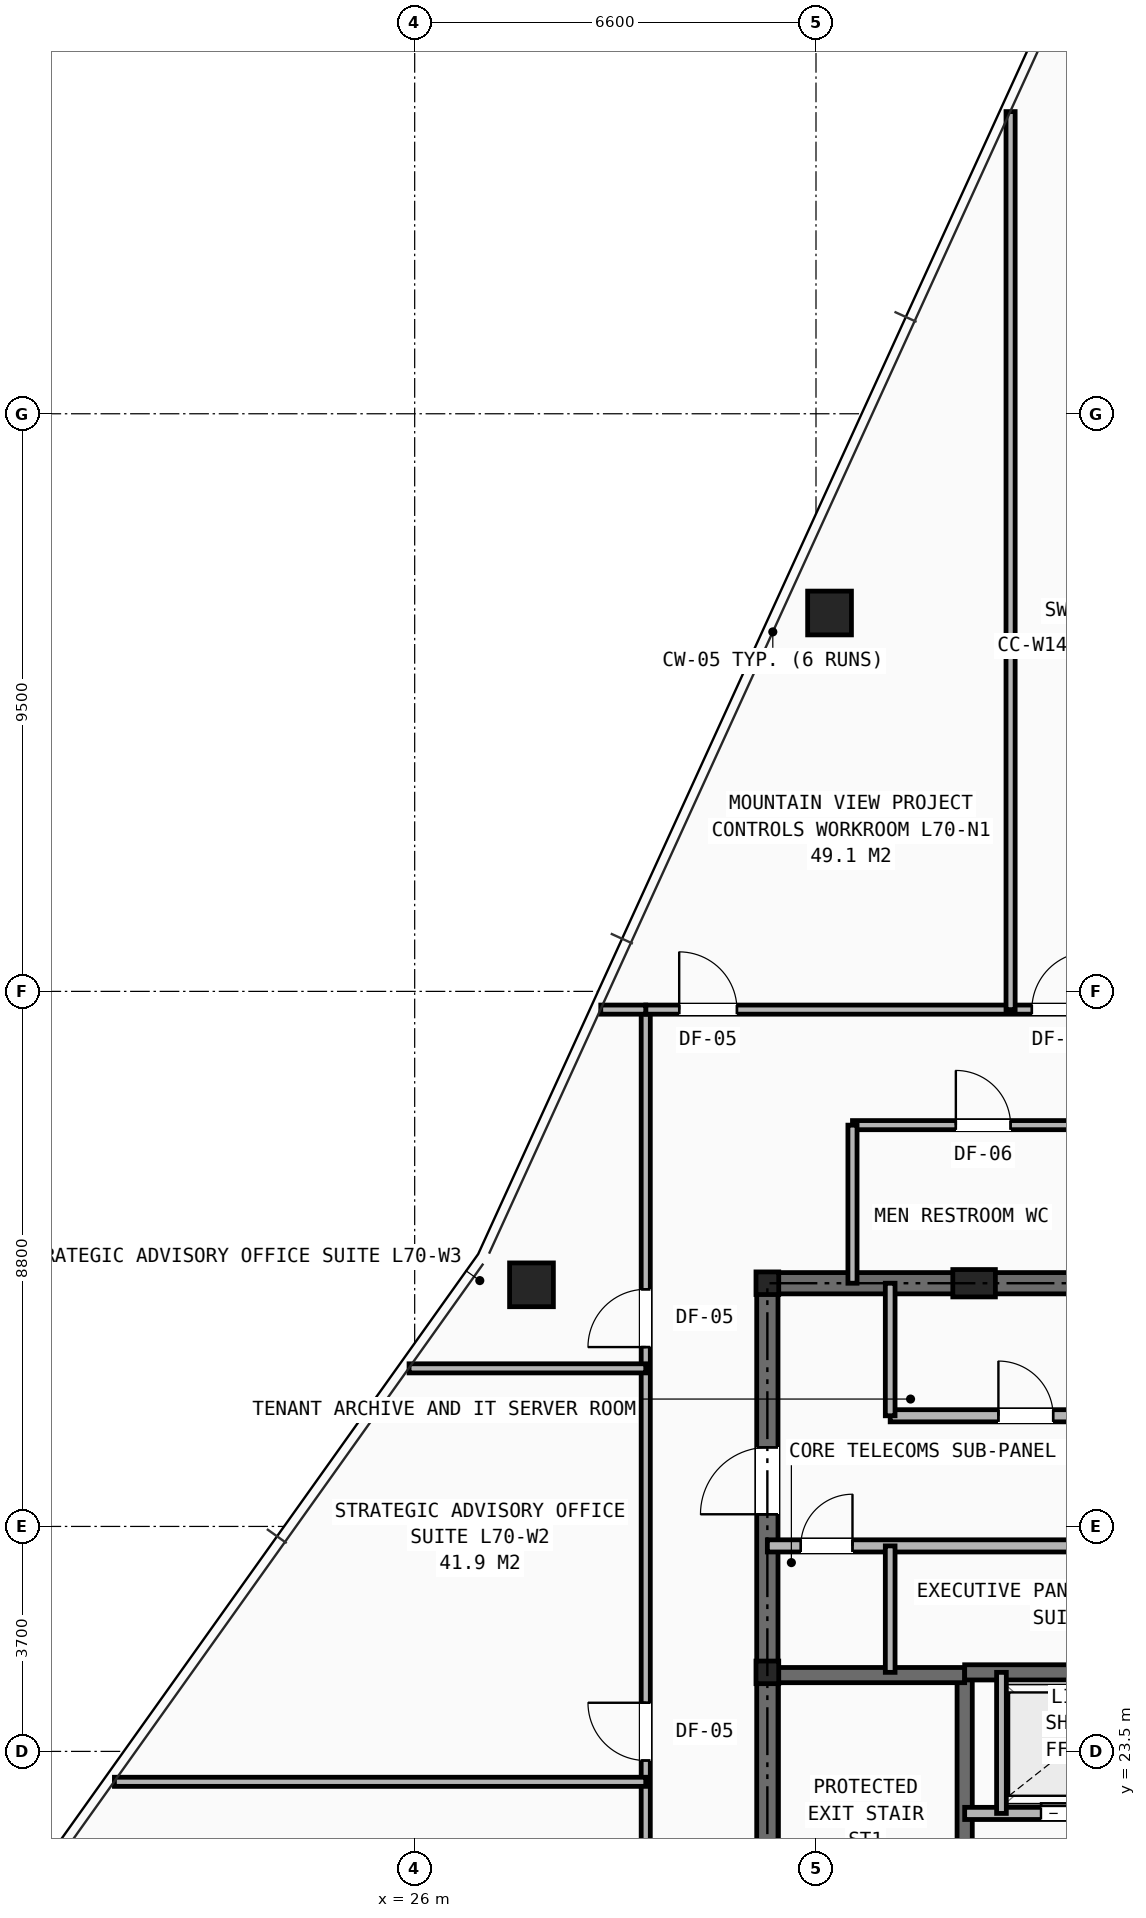
"""IFC4 building model, lengths in metres.
Left out: names, types, materials, properties, quantities, classifications, styles, units other than length and angle.
Written with IfcOpenShell. Run it as: python <this file> out.ifc"""

import sys

from ifc_helpers import new_model, si_unit, direction, frame, frame_2d, origin, origin_2d, place, context, subcontext, project, spatial, rectangle, hollow_rectangle, i_section, extrude, element, fill, save


model = new_model("IFC4")
c1 = context("Model", 3, precision=1e-05, world=origin(), true_north=direction((0.0, 1.0)))
c2 = subcontext(c1, "Body", "Model", "MODEL_VIEW")
j1 = project(units=[si_unit("LENGTHUNIT", "METRE"), si_unit("PLANEANGLEUNIT", "RADIAN")], contexts=[c1])
p1 = place(None, origin())
s1 = spatial("IfcSite", under=j1, at=p1, CompositionType="ELEMENT")
p2 = place(p1, origin())
s2 = spatial("IfcBuilding", under=s1, at=p2, CompositionType="ELEMENT")
p3 = place(p2, frame((0.0, 0.0, 246.9)))
s3 = spatial("IfcBuildingStorey", under=s2, at=p3, CompositionType="ELEMENT", Elevation=246.9)
for number, where, z_axis, x_axis in (
    (1, (31.8, 24.8, 0.0), (0.0, 0.0, 1.0), (1.0, 0.0, 0.0)),
    (2, (31.8, 31.2, 0.0), (0.0, 0.0, 1.0), (1.0, 0.0, 0.0)),
):
    element("IfcColumn", number, at=place(p3, frame(where, z_axis=z_axis, x_axis=x_axis)), inside=s3, PredefinedType="COLUMN", context=c2, shape_type="SweptSolid", body=[
        extrude(i_section(OverallWidth=0.374, OverallDepth=0.372, WebThickness=0.016, FlangeThickness=0.026, at=origin_2d()), origin(), (0.0, 0.0, 1.0), 3.5),
    ])
p4 = place(p3, frame((35.2, 31.2, 0.0), z_axis=(0.0, 0.0, 1.0), x_axis=(1.0, 0.0, 0.0)))
e3 = element("IfcColumn", 3, at=p4, inside=s3, PredefinedType="PILASTER", context=c2, shape_type="SweptSolid", body=[
    extrude(rectangle(XDim=0.7, YDim=0.45, at=origin_2d()), origin(), (0.0, 0.0, 1.0), 3.5),
])
for number, where, z_axis, x_axis in (
    (4, (32.823, 42.223, 0.0), (0.0, 0.0, 1.0), (1.0, 0.0, 0.0)),
    (5, (27.921, 31.174, 0.0), (0.0, 0.0, 1.0), (1.0, 0.0, 0.0)),
):
    element("IfcColumn", number, at=place(p3, frame(where, z_axis=z_axis, x_axis=x_axis)), inside=s3, PredefinedType="COLUMN", context=c2, shape_type="SweptSolid", body=[
        extrude(hollow_rectangle(XDim=0.72, YDim=0.72, WallThickness=0.05, at=origin_2d()), origin(), (0.0, 0.0, 1.0), 3.5),
    ])
p5 = place(p3, frame((31.8, 31.2, 0.0), z_axis=(0.0, 0.0, 1.0), x_axis=(1.0, 0.0, 0.0)))
e6 = element("IfcWall", 6, at=p5, inside=s3, PredefinedType="SHEAR", context=c2, shape_type="SweptSolid", body=[
    extrude(rectangle(XDim=16.4, YDim=0.35, at=frame_2d((8.2, 0.0))), origin(), (0.0, 0.0, 1.0), 3.2),
])
p6 = place(p3, frame((31.8, 16.4, 0.0), z_axis=(0.0, 0.0, 1.0), x_axis=(0.0, 1.0, 0.0)))
e7 = element("IfcWall", 7, at=p6, inside=s3, PredefinedType="SHEAR", context=c2, shape_type="SweptSolid", body=[
    extrude(rectangle(XDim=14.8, YDim=0.35, at=frame_2d((7.4, 0.0))), origin(), (0.0, 0.0, 1.0), 3.2),
])
p7 = place(p6, frame((11.0, 0.0, 0.0)))
e8 = element("IfcOpeningElement", 8, at=p7, cuts=e7, PredefinedType="OPENING", context=c2, shape_type="SweptSolid", body=[
    extrude(rectangle(XDim=1.1, YDim=2.15, at=frame_2d((0.55, 1.075))), frame((0.0, 0.185, 0.0), z_axis=(0.0, -1.0, 0.0), x_axis=(1.0, 0.0, 0.0)), (0.0, 0.0, 1.0), 0.37),
])
p8 = place(p3, frame((35.045, 16.4, 0.0), z_axis=(0.0, 0.0, 1.0), x_axis=(0.0, 1.0, 0.0)))
e9 = element("IfcWall", 9, at=p8, inside=s3, PredefinedType="SHEAR", context=c2, shape_type="SweptSolid", body=[
    extrude(rectangle(XDim=8.4, YDim=0.25, at=frame_2d((4.2, 0.0))), origin(), (0.0, 0.0, 1.0), 3.2),
])
p9 = place(p8, frame((0.45, 0.0, 0.0)))
e10 = element("IfcOpeningElement", 10, at=p9, cuts=e9, PredefinedType="OPENING", context=c2, shape_type="SweptSolid", body=[
    extrude(rectangle(XDim=0.95, YDim=2.1, at=frame_2d((0.475, 1.05))), frame((0.0, 0.135, 0.0), z_axis=(0.0, -1.0, 0.0), x_axis=(1.0, 0.0, 0.0)), (0.0, 0.0, 1.0), 0.27),
])
p10 = place(p3, frame((31.8, 24.755, 0.0), z_axis=(0.0, 0.0, 1.0), x_axis=(1.0, 0.0, 0.0)))
e11 = element("IfcWall", 11, at=p10, inside=s3, PredefinedType="SHEAR", context=c2, shape_type="SweptSolid", body=[
    extrude(rectangle(XDim=3.245, YDim=0.25, at=frame_2d((1.623, 0.0))), origin(), (0.0, 0.0, 1.0), 3.2),
])
p11 = place(p3, frame((35.045, 24.8, 0.0), z_axis=(0.0, 0.0, 1.0), x_axis=(1.0, 0.0, 0.0)))
e12 = element("IfcWall", 12, at=p11, inside=s3, PredefinedType="SHEAR", context=c2, shape_type="SweptSolid", body=[
    extrude(rectangle(XDim=9.91, YDim=0.25, at=frame_2d((4.955, 0.0))), origin(), (0.0, 0.0, 1.0), 3.2),
])
p12 = place(p3, frame((35.045, 22.48, 0.0), z_axis=(0.0, 0.0, 1.0), x_axis=(1.0, 0.0, 0.0)))
e13 = element("IfcWall", 13, at=p12, inside=s3, PredefinedType="SOLIDWALL", context=c2, shape_type="SweptSolid", body=[
    extrude(rectangle(XDim=9.91, YDim=0.2, at=frame_2d((4.955, 0.0))), origin(), (0.0, 0.0, 1.0), 3.2),
])
p13 = place(p12, frame((1.255, 0.0, 0.0)))
e14 = element("IfcOpeningElement", 14, at=p13, cuts=e13, PredefinedType="OPENING", context=c2, shape_type="SweptSolid", body=[
    extrude(rectangle(XDim=1.1, YDim=2.15, at=frame_2d((0.55, 1.075))), frame((0.0, 0.11, 0.0), z_axis=(0.0, -1.0, 0.0), x_axis=(1.0, 0.0, 0.0)), (0.0, 0.0, 1.0), 0.22),
])
p14 = place(p12, frame((7.555, 0.0, 0.0)))
e15 = element("IfcOpeningElement", 15, at=p14, cuts=e13, PredefinedType="OPENING", context=c2, shape_type="SweptSolid", body=[
    extrude(rectangle(XDim=1.1, YDim=2.15, at=frame_2d((0.55, 1.075))), frame((0.0, 0.11, 0.0), z_axis=(0.0, -1.0, 0.0), x_axis=(1.0, 0.0, 0.0)), (0.0, 0.0, 1.0), 0.22),
])
p15 = place(p12, frame((4.405, 0.0, 0.0)))
e16 = element("IfcOpeningElement", 16, at=p15, cuts=e13, PredefinedType="OPENING", context=c2, shape_type="SweptSolid", body=[
    extrude(rectangle(XDim=1.1, YDim=2.15, at=frame_2d((0.55, 1.075))), frame((0.0, 0.11, 0.0), z_axis=(0.0, -1.0, 0.0), x_axis=(1.0, 0.0, 0.0)), (0.0, 0.0, 1.0), 0.22),
])
p16 = place(p3, frame((35.65, 22.48, 0.0), z_axis=(0.0, 0.0, 1.0), x_axis=(0.0, 1.0, 0.0)))
e17 = element("IfcWall", 17, at=p16, inside=s3, PredefinedType="SOLIDWALL", context=c2, shape_type="SweptSolid", body=[
    extrude(rectangle(XDim=2.32, YDim=0.16, at=frame_2d((1.16, 0.0))), origin(), (0.0, 0.0, 1.0), 3.2),
])
p17 = place(p3, frame((33.82, 29.02, 0.0), z_axis=(0.0, 0.0, 1.0), x_axis=(1.0, 0.0, 0.0)))
e18 = element("IfcWall", 18, at=p17, inside=s3, PredefinedType="SOLIDWALL", context=c2, shape_type="SweptSolid", body=[
    extrude(rectangle(XDim=14.38, YDim=0.2, at=frame_2d((7.19, 0.0))), origin(), (0.0, 0.0, 1.0), 2.655),
])
p18 = place(p17, frame((1.78, 0.0, 0.0)))
e19 = element("IfcOpeningElement", 19, at=p18, cuts=e18, PredefinedType="OPENING", context=c2, shape_type="SweptSolid", body=[
    extrude(rectangle(XDim=0.9, YDim=2.1, at=frame_2d((0.45, 1.05))), frame((0.0, 0.11, 0.0), z_axis=(0.0, -1.0, 0.0), x_axis=(1.0, 0.0, 0.0)), (0.0, 0.0, 1.0), 0.22),
])
p19 = place(p17, frame((6.07, 0.0, 0.0)))
e20 = element("IfcOpeningElement", 20, at=p19, cuts=e18, PredefinedType="OPENING", context=c2, shape_type="SweptSolid", body=[
    extrude(rectangle(XDim=0.9, YDim=2.1, at=frame_2d((0.45, 1.05))), frame((0.0, 0.11, 0.0), z_axis=(0.0, -1.0, 0.0), x_axis=(1.0, 0.0, 0.0)), (0.0, 0.0, 1.0), 0.22),
])
p20 = place(p17, frame((9.39, 0.0, 0.0)))
e21 = element("IfcOpeningElement", 21, at=p20, cuts=e18, PredefinedType="OPENING", context=c2, shape_type="SweptSolid", body=[
    extrude(rectangle(XDim=1.1, YDim=2.15, at=frame_2d((0.55, 1.075))), frame((0.0, 0.11, 0.0), z_axis=(0.0, -1.0, 0.0), x_axis=(1.0, 0.0, 0.0)), (0.0, 0.0, 1.0), 0.22),
])
p21 = place(p17, frame((11.71, 0.0, 0.0)))
e22 = element("IfcOpeningElement", 22, at=p21, cuts=e18, PredefinedType="OPENING", context=c2, shape_type="SweptSolid", body=[
    extrude(rectangle(XDim=1.1, YDim=2.15, at=frame_2d((0.55, 1.075))), frame((0.0, 0.11, 0.0), z_axis=(0.0, -1.0, 0.0), x_axis=(1.0, 0.0, 0.0)), (0.0, 0.0, 1.0), 0.22),
])
p22 = place(p3, frame((31.8, 26.88, 0.0), z_axis=(0.0, 0.0, 1.0), x_axis=(1.0, 0.0, 0.0)))
e23 = element("IfcWall", 23, at=p22, inside=s3, PredefinedType="SOLIDWALL", context=c2, shape_type="SweptSolid", body=[
    extrude(rectangle(XDim=16.4, YDim=0.2, at=frame_2d((8.2, 0.0))), origin(), (0.0, 0.0, 1.0), 2.655),
])
p23 = place(p22, frame((0.55, 0.0, 0.0)))
e24 = element("IfcOpeningElement", 24, at=p23, cuts=e23, PredefinedType="OPENING", context=c2, shape_type="SweptSolid", body=[
    extrude(rectangle(XDim=0.85, YDim=2.05, at=frame_2d((0.425, 1.025))), frame((0.0, 0.11, 0.0), z_axis=(0.0, -1.0, 0.0), x_axis=(1.0, 0.0, 0.0)), (0.0, 0.0, 1.0), 0.22),
])
p24 = place(p22, frame((5.94, 0.0, 0.0)))
e25 = element("IfcOpeningElement", 25, at=p24, cuts=e23, PredefinedType="OPENING", context=c2, shape_type="SweptSolid", body=[
    extrude(rectangle(XDim=0.9, YDim=2.1, at=frame_2d((0.45, 1.05))), frame((0.0, 0.11, 0.0), z_axis=(0.0, -1.0, 0.0), x_axis=(1.0, 0.0, 0.0)), (0.0, 0.0, 1.0), 0.22),
])
p25 = place(p22, frame((11.41, 0.0, 0.0)))
e26 = element("IfcOpeningElement", 26, at=p25, cuts=e23, PredefinedType="OPENING", context=c2, shape_type="SweptSolid", body=[
    extrude(rectangle(XDim=1.1, YDim=2.15, at=frame_2d((0.55, 1.075))), frame((0.0, 0.11, 0.0), z_axis=(0.0, -1.0, 0.0), x_axis=(1.0, 0.0, 0.0)), (0.0, 0.0, 1.0), 0.22),
])
p26 = place(p22, frame((13.73, 0.0, 0.0)))
e27 = element("IfcOpeningElement", 27, at=p26, cuts=e23, PredefinedType="OPENING", context=c2, shape_type="SweptSolid", body=[
    extrude(rectangle(XDim=1.1, YDim=2.15, at=frame_2d((0.55, 1.075))), frame((0.0, 0.11, 0.0), z_axis=(0.0, -1.0, 0.0), x_axis=(1.0, 0.0, 0.0)), (0.0, 0.0, 1.0), 0.22),
])
p27 = place(p3, frame((33.82, 29.02, 0.0), z_axis=(0.0, 0.0, 1.0), x_axis=(0.0, 1.0, 0.0)))
e28 = element("IfcWall", 28, at=p27, inside=s3, PredefinedType="SOLIDWALL", context=c2, shape_type="SweptSolid", body=[
    extrude(rectangle(XDim=2.18, YDim=0.16, at=frame_2d((1.09, 0.0))), origin(), (0.0, 0.0, 1.0), 2.928),
])
p28 = place(p3, frame((33.82, 24.8, 0.0), z_axis=(0.0, 0.0, 1.0), x_axis=(0.0, 1.0, 0.0)))
e29 = element("IfcWall", 29, at=p28, inside=s3, PredefinedType="SOLIDWALL", context=c2, shape_type="SweptSolid", body=[
    extrude(rectangle(XDim=2.08, YDim=0.16, at=frame_2d((1.04, 0.0))), origin(), (0.0, 0.0, 1.0), 3.2),
])
p29 = place(p3, frame((33.2, 33.8, 0.0), z_axis=(0.0, 0.0, 1.0), x_axis=(1.0, 0.0, 0.0)))
e30 = element("IfcWall", 30, at=p29, inside=s3, PredefinedType="PARTITIONING", context=c2, shape_type="SweptSolid", body=[
    extrude(rectangle(XDim=13.0, YDim=0.15, at=frame_2d((6.5, 0.0))), origin(), (0.0, 0.0, 1.0), 3.2),
])
p30 = place(p29, frame((1.7, 0.0, 0.0)))
e31 = element("IfcOpeningElement", 31, at=p30, cuts=e30, PredefinedType="OPENING", context=c2, shape_type="SweptSolid", body=[
    extrude(rectangle(XDim=0.9, YDim=2.1, at=frame_2d((0.45, 1.05))), frame((0.0, 0.085, 0.0), z_axis=(0.0, -1.0, 0.0), x_axis=(1.0, 0.0, 0.0)), (0.0, 0.0, 1.0), 0.17),
])
p31 = place(p29, frame((6.0, 0.0, 0.0)))
e32 = element("IfcOpeningElement", 32, at=p31, cuts=e30, PredefinedType="OPENING", context=c2, shape_type="SweptSolid", body=[
    extrude(rectangle(XDim=0.9, YDim=2.1, at=frame_2d((0.45, 1.05))), frame((0.0, 0.085, 0.0), z_axis=(0.0, -1.0, 0.0), x_axis=(1.0, 0.0, 0.0)), (0.0, 0.0, 1.0), 0.17),
])
p32 = place(p29, frame((10.35, 0.0, 0.0)))
e33 = element("IfcOpeningElement", 33, at=p32, cuts=e30, PredefinedType="OPENING", context=c2, shape_type="SweptSolid", body=[
    extrude(rectangle(XDim=0.9, YDim=2.1, at=frame_2d((0.45, 1.05))), frame((0.0, 0.085, 0.0), z_axis=(0.0, -1.0, 0.0), x_axis=(1.0, 0.0, 0.0)), (0.0, 0.0, 1.0), 0.17),
])
p33 = place(p3, frame((33.2, 31.2, 0.0), z_axis=(0.0, 0.0, 1.0), x_axis=(0.0, 1.0, 0.0)))
e34 = element("IfcWall", 34, at=p33, inside=s3, PredefinedType="PARTITIONING", context=c2, shape_type="SweptSolid", body=[
    extrude(rectangle(XDim=2.6, YDim=0.15, at=frame_2d((1.3, 0.0))), origin(), (0.0, 0.0, 1.0), 2.928),
])
p34 = place(p3, frame((29.8, 16.4, 0.0), z_axis=(0.0, 0.0, 1.0), x_axis=(0.0, 1.0, 0.0)))
e35 = element("IfcWall", 35, at=p34, inside=s3, PredefinedType="PARTITIONING", context=c2, shape_type="SweptSolid", body=[
    extrude(rectangle(XDim=19.3, YDim=0.15, at=frame_2d((9.65, 0.0))), origin(), (0.0, 0.0, 1.0), 2.215),
])
p35 = place(p34, frame((0.35, 0.0, 0.0)))
e36 = element("IfcOpeningElement", 36, at=p35, cuts=e35, PredefinedType="OPENING", context=c2, shape_type="SweptSolid", body=[
    extrude(rectangle(XDim=0.95, YDim=2.1, at=frame_2d((0.475, 1.05))), frame((0.0, 0.085, 0.0), z_axis=(0.0, -1.0, 0.0), x_axis=(1.0, 0.0, 0.0)), (0.0, 0.0, 1.0), 0.17),
])
p36 = place(p34, frame((6.95, 0.0, 0.0)))
e37 = element("IfcOpeningElement", 37, at=p36, cuts=e35, PredefinedType="OPENING", context=c2, shape_type="SweptSolid", body=[
    extrude(rectangle(XDim=0.95, YDim=2.1, at=frame_2d((0.475, 1.05))), frame((0.0, 0.085, 0.0), z_axis=(0.0, -1.0, 0.0), x_axis=(1.0, 0.0, 0.0)), (0.0, 0.0, 1.0), 0.17),
])
p37 = place(p34, frame((13.75, 0.0, 0.0)))
e38 = element("IfcOpeningElement", 38, at=p37, cuts=e35, PredefinedType="OPENING", context=c2, shape_type="SweptSolid", body=[
    extrude(rectangle(XDim=0.95, YDim=2.1, at=frame_2d((0.475, 1.05))), frame((0.0, 0.085, 0.0), z_axis=(0.0, -1.0, 0.0), x_axis=(1.0, 0.0, 0.0)), (0.0, 0.0, 1.0), 0.17),
])
p38 = place(p3, frame((29.8, 35.7, 0.0), z_axis=(0.0, 0.0, 1.0), x_axis=(1.0, 0.0, 0.0)))
e39 = element("IfcWall", 39, at=p38, inside=s3, PredefinedType="PARTITIONING", context=c2, shape_type="SweptSolid", body=[
    extrude(rectangle(XDim=9.45, YDim=0.15, at=frame_2d((4.725, 0.0))), origin(), (0.0, 0.0, 1.0), 2.578),
])
p39 = place(p38, frame((0.55, 0.0, 0.0)))
e40 = element("IfcOpeningElement", 40, at=p39, cuts=e39, PredefinedType="OPENING", context=c2, shape_type="SweptSolid", body=[
    extrude(rectangle(XDim=0.95, YDim=2.1, at=frame_2d((0.475, 1.05))), frame((0.0, 0.085, 0.0), z_axis=(0.0, -1.0, 0.0), x_axis=(1.0, 0.0, 0.0)), (0.0, 0.0, 1.0), 0.17),
])
p40 = place(p38, frame((6.35, 0.0, 0.0)))
e41 = element("IfcOpeningElement", 41, at=p40, cuts=e39, PredefinedType="OPENING", context=c2, shape_type="SweptSolid", body=[
    extrude(rectangle(XDim=0.95, YDim=2.1, at=frame_2d((0.475, 1.05))), frame((0.0, 0.085, 0.0), z_axis=(0.0, -1.0, 0.0), x_axis=(1.0, 0.0, 0.0)), (0.0, 0.0, 1.0), 0.17),
])
p41 = place(p3, frame((29.06, 35.7, 0.0), z_axis=(0.0, 0.0, 1.0), x_axis=(1.0, 0.0, 0.0)))
e42 = element("IfcWall", 42, at=p41, inside=s3, PredefinedType="PARTITIONING", context=c2, shape_type="SweptSolid", body=[
    extrude(rectangle(XDim=0.74, YDim=0.15, at=frame_2d((0.37, 0.0))), origin(), (0.0, 0.0, 1.0), 2.578),
])
p42 = place(p3, frame((21.062, 23.0, 0.0), z_axis=(0.0, 0.0, 1.0), x_axis=(1.0, 0.0, 0.0)))
e43 = element("IfcWall", 43, at=p42, inside=s3, PredefinedType="PARTITIONING", context=c2, shape_type="SweptSolid", body=[
    extrude(rectangle(XDim=8.738, YDim=0.15, at=frame_2d((4.369, 0.0))), origin(), (0.0, 0.0, 1.0), 2.578),
])
p43 = place(p3, frame((25.908, 29.8, 0.0), z_axis=(0.0, 0.0, 1.0), x_axis=(1.0, 0.0, 0.0)))
e44 = element("IfcWall", 44, at=p43, inside=s3, PredefinedType="PARTITIONING", context=c2, shape_type="SweptSolid", body=[
    extrude(rectangle(XDim=3.892, YDim=0.15, at=frame_2d((1.946, 0.0))), origin(), (0.0, 0.0, 1.0), 2.578),
])
p44 = place(p3, frame((35.8, 35.7, 0.0), z_axis=(0.0, 0.0, 1.0), x_axis=(0.0, 1.0, 0.0)))
e45 = element("IfcWall", 45, at=p44, inside=s3, PredefinedType="PARTITIONING", context=c2, shape_type="SweptSolid", body=[
    extrude(rectangle(XDim=14.77, YDim=0.15, at=frame_2d((7.385, 0.0))), origin(), (0.0, 0.0, 1.0), 2.215),
])
p45 = place(p13, origin())
e46 = element("IfcDoor", 46, at=p45, inside=s3, OperationType="DOUBLE_DOOR_SLIDING", PredefinedType="DOOR", context=c2, shape_type="SweptSolid", body=[
    extrude(rectangle(XDim=1.1, YDim=2.15, at=frame_2d((0.55, 1.075))), frame((0.0, 0.025, 0.0), z_axis=(0.0, -1.0, 0.0), x_axis=(1.0, 0.0, 0.0)), (0.0, 0.0, 1.0), 0.05),
])
fill(e14, e46)
p46 = place(p23, origin())
e47 = element("IfcDoor", 47, at=p46, inside=s3, OperationType="SINGLE_SWING_RIGHT", PredefinedType="DOOR", context=c2, shape_type="SweptSolid", body=[
    extrude(rectangle(XDim=0.85, YDim=2.05, at=frame_2d((0.425, 1.025))), frame((0.0, 0.025, 0.0), z_axis=(0.0, -1.0, 0.0), x_axis=(1.0, 0.0, 0.0)), (0.0, 0.0, 1.0), 0.05),
])
fill(e24, e47)
p47 = place(p7, origin())
e48 = element("IfcDoor", 48, at=p47, inside=s3, OperationType="SINGLE_SWING_LEFT", PredefinedType="DOOR", context=c2, shape_type="SweptSolid", body=[
    extrude(rectangle(XDim=1.1, YDim=2.15, at=frame_2d((0.55, 1.075))), frame((0.0, 0.025, 0.0), z_axis=(0.0, -1.0, 0.0), x_axis=(1.0, 0.0, 0.0)), (0.0, 0.0, 1.0), 0.05),
])
fill(e8, e48)
p48 = place(p18, origin())
e49 = element("IfcDoor", 49, at=p48, inside=s3, OperationType="SINGLE_SWING_LEFT", PredefinedType="DOOR", context=c2, shape_type="SweptSolid", body=[
    extrude(rectangle(XDim=0.9, YDim=2.1, at=frame_2d((0.45, 1.05))), frame((0.0, 0.025, 0.0), z_axis=(0.0, -1.0, 0.0), x_axis=(1.0, 0.0, 0.0)), (0.0, 0.0, 1.0), 0.05),
])
fill(e19, e49)
p49 = place(p30, origin())
e50 = element("IfcDoor", 50, at=p49, inside=s3, OperationType="SINGLE_SWING_LEFT", PredefinedType="DOOR", context=c2, shape_type="SweptSolid", body=[
    extrude(rectangle(XDim=0.9, YDim=2.1, at=frame_2d((0.45, 1.05))), frame((0.0, 0.025, 0.0), z_axis=(0.0, -1.0, 0.0), x_axis=(1.0, 0.0, 0.0)), (0.0, 0.0, 1.0), 0.05),
])
fill(e31, e50)
p50 = place(p36, origin())
e51 = element("IfcDoor", 51, at=p50, inside=s3, OperationType="SINGLE_SWING_RIGHT", PredefinedType="DOOR", context=c2, shape_type="SweptSolid", body=[
    extrude(rectangle(XDim=0.95, YDim=2.1, at=frame_2d((0.475, 1.05))), frame((0.0, 0.025, 0.0), z_axis=(0.0, -1.0, 0.0), x_axis=(1.0, 0.0, 0.0)), (0.0, 0.0, 1.0), 0.05),
])
fill(e37, e51)
p51 = place(p37, origin())
e52 = element("IfcDoor", 52, at=p51, inside=s3, OperationType="SINGLE_SWING_LEFT", PredefinedType="DOOR", context=c2, shape_type="SweptSolid", body=[
    extrude(rectangle(XDim=0.95, YDim=2.1, at=frame_2d((0.475, 1.05))), frame((0.0, 0.025, 0.0), z_axis=(0.0, -1.0, 0.0), x_axis=(1.0, 0.0, 0.0)), (0.0, 0.0, 1.0), 0.05),
])
fill(e38, e52)
p52 = place(p39, origin())
e53 = element("IfcDoor", 53, at=p52, inside=s3, OperationType="SINGLE_SWING_LEFT", PredefinedType="DOOR", context=c2, shape_type="SweptSolid", body=[
    extrude(rectangle(XDim=0.95, YDim=2.1, at=frame_2d((0.475, 1.05))), frame((0.0, 0.025, 0.0), z_axis=(0.0, -1.0, 0.0), x_axis=(1.0, 0.0, 0.0)), (0.0, 0.0, 1.0), 0.05),
])
fill(e40, e53)
p53 = place(p40, origin())
e54 = element("IfcDoor", 54, at=p53, inside=s3, OperationType="SINGLE_SWING_RIGHT", PredefinedType="DOOR", context=c2, shape_type="SweptSolid", body=[
    extrude(rectangle(XDim=0.95, YDim=2.1, at=frame_2d((0.475, 1.05))), frame((0.0, 0.025, 0.0), z_axis=(0.0, -1.0, 0.0), x_axis=(1.0, 0.0, 0.0)), (0.0, 0.0, 1.0), 0.05),
])
fill(e41, e54)
save(model, sys.argv[1])
